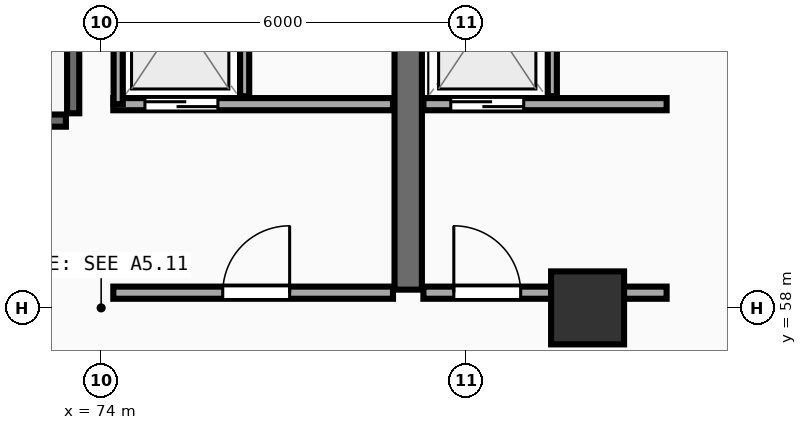
"""IFC4 building model, lengths in metres.
Left out: names, types, materials, properties, quantities, classifications, styles, units other than length and angle.
Written with IfcOpenShell. Run it as: python <this file> out.ifc"""

import sys

from ifc_helpers import new_model, si_unit, direction, frame, frame_2d, origin, origin_2d, place, context, subcontext, project, spatial, rectangle, extrude, element, fill, save


model = new_model("IFC4")
c1 = context("Model", 3, precision=1e-05, world=origin(), true_north=direction((0.0, 1.0)))
c2 = subcontext(c1, "Body", "Model", "MODEL_VIEW")
j1 = project(units=[si_unit("LENGTHUNIT", "METRE"), si_unit("PLANEANGLEUNIT", "RADIAN")], contexts=[c1])
p1 = place(None, origin())
s1 = spatial("IfcSite", under=j1, at=p1, CompositionType="ELEMENT")
p2 = place(p1, origin())
s2 = spatial("IfcBuilding", under=s1, at=p2, CompositionType="ELEMENT")
p3 = place(p2, frame((0.0, 0.0, 129.86)))
s3 = spatial("IfcBuildingStorey", under=s2, at=p3, CompositionType="ELEMENT", Elevation=129.86)
p4 = place(p3, frame((82.0, 58.0, 0.0), z_axis=(0.0, 0.0, 1.0), x_axis=(1.0, 0.0, 0.0)))
e1 = element("IfcColumn", 1, at=p4, inside=s3, PredefinedType="PILASTER", context=c2, shape_type="SweptSolid", body=[
    extrude(rectangle(XDim=1.2, YDim=1.2, at=origin_2d()), origin(), (0.0, 0.0, 1.0), 5.74),
])
p5 = place(p3, frame((66.26, 61.08, 0.0), z_axis=(0.0, 0.0, 1.0), x_axis=(1.0, 0.0, 0.0)))
e2 = element("IfcWall", 2, at=p5, inside=s3, PredefinedType="SHEAR", context=c2, shape_type="SweptSolid", body=[
    extrude(rectangle(XDim=7.16, YDim=0.2, at=frame_2d((3.58, 0.0))), origin(), (0.0, 0.0, 1.0), 5.48),
])
p6 = place(p3, frame((73.54, 61.2, 0.0), z_axis=(0.0, 0.0, 1.0), x_axis=(0.0, 1.0, 0.0)))
e3 = element("IfcWall", 3, at=p6, inside=s3, PredefinedType="SHEAR", context=c2, shape_type="SweptSolid", body=[
    extrude(rectangle(XDim=3.07, YDim=0.2, at=frame_2d((1.535, 0.0))), origin(), (0.0, 0.0, 1.0), 5.48),
])
p7 = place(p3, frame((79.05, 58.3, 0.0), z_axis=(0.0, 0.0, 1.0), x_axis=(0.0, 1.0, 0.0)))
e4 = element("IfcWall", 4, at=p7, inside=s3, PredefinedType="SHEAR", context=c2, shape_type="SweptSolid", body=[
    extrude(rectangle(XDim=6.3, YDim=0.45, at=frame_2d((3.15, 0.0))), origin(), (0.0, 0.0, 1.0), 5.48),
])
p8 = place(p3, frame((74.2, 61.35, 0.0), z_axis=(0.0, 0.0, 1.0), x_axis=(1.0, 0.0, 0.0)))
e5 = element("IfcWall", 5, at=p8, inside=s3, PredefinedType="SOLIDWALL", context=c2, shape_type="SweptSolid", body=[
    extrude(rectangle(XDim=4.6, YDim=0.2, at=frame_2d((2.3, 0.0))), origin(), (0.0, 0.0, 1.0), 5.47),
])
p9 = place(p8, frame((0.52, 0.0, 0.0)))
e6 = element("IfcOpeningElement", 6, at=p9, cuts=e5, PredefinedType="OPENING", context=c2, shape_type="SweptSolid", body=[
    extrude(rectangle(XDim=1.2, YDim=2.15, at=frame_2d((0.6, 1.075))), frame((0.0, 0.11, 0.0), z_axis=(0.0, -1.0, 0.0), x_axis=(1.0, 0.0, 0.0)), (0.0, 0.0, 1.0), 0.22),
])
p10 = place(p3, frame((74.28, 61.35, 0.0), z_axis=(0.0, 0.0, 1.0), x_axis=(0.0, 1.0, 0.0)))
e7 = element("IfcWall", 7, at=p10, inside=s3, PredefinedType="PARTITIONING", context=c2, shape_type="SweptSolid", body=[
    extrude(rectangle(XDim=2.97, YDim=0.15, at=frame_2d((1.485, 0.0))), origin(), (0.0, 0.0, 1.0), 5.47),
])
p11 = place(p3, frame((76.36, 61.48, 0.0), z_axis=(0.0, 0.0, 1.0), x_axis=(0.0, 1.0, 0.0)))
e8 = element("IfcWall", 8, at=p11, inside=s3, PredefinedType="PARTITIONING", context=c2, shape_type="SweptSolid", body=[
    extrude(rectangle(XDim=2.84, YDim=0.15, at=frame_2d((1.42, 0.0))), origin(), (0.0, 0.0, 1.0), 5.47),
])
p12 = place(p3, frame((79.3, 61.35, 0.0), z_axis=(0.0, 0.0, 1.0), x_axis=(1.0, 0.0, 0.0)))
e9 = element("IfcWall", 9, at=p12, inside=s3, PredefinedType="SOLIDWALL", context=c2, shape_type="SweptSolid", body=[
    extrude(rectangle(XDim=4.0, YDim=0.2, at=frame_2d((2.0, 0.0))), origin(), (0.0, 0.0, 1.0), 4.765),
])
p13 = place(p12, frame((0.45, 0.0, 0.0)))
e10 = element("IfcOpeningElement", 10, at=p13, cuts=e9, PredefinedType="OPENING", context=c2, shape_type="SweptSolid", body=[
    extrude(rectangle(XDim=1.2, YDim=2.15, at=frame_2d((0.6, 1.075))), frame((0.0, 0.11, 0.0), z_axis=(0.0, -1.0, 0.0), x_axis=(1.0, 0.0, 0.0)), (0.0, 0.0, 1.0), 0.22),
])
p14 = place(p3, frame((81.42, 61.48, 0.0), z_axis=(0.0, 0.0, 1.0), x_axis=(0.0, 1.0, 0.0)))
e11 = element("IfcWall", 11, at=p14, inside=s3, PredefinedType="PARTITIONING", context=c2, shape_type="SweptSolid", body=[
    extrude(rectangle(XDim=2.84, YDim=0.15, at=frame_2d((1.42, 0.0))), origin(), (0.0, 0.0, 1.0), 5.47),
])
p15 = place(p3, frame((74.2, 58.25, 0.0), z_axis=(0.0, 0.0, 1.0), x_axis=(1.0, 0.0, 0.0)))
e12 = element("IfcWall", 12, at=p15, inside=s3, PredefinedType="SOLIDWALL", context=c2, shape_type="SweptSolid", body=[
    extrude(rectangle(XDim=4.6, YDim=0.2, at=frame_2d((2.3, 0.0))), origin(), (0.0, 0.0, 1.0), 5.47),
])
p16 = place(p15, frame((1.8, 0.0, 0.0)))
e13 = element("IfcOpeningElement", 13, at=p16, cuts=e12, PredefinedType="OPENING", context=c2, shape_type="SweptSolid", body=[
    extrude(rectangle(XDim=1.1, YDim=2.1, at=frame_2d((0.55, 1.05))), frame((0.0, 0.11, 0.0), z_axis=(0.0, -1.0, 0.0), x_axis=(1.0, 0.0, 0.0)), (0.0, 0.0, 1.0), 0.22),
])
p17 = place(p3, frame((79.3, 58.25, 0.0), z_axis=(0.0, 0.0, 1.0), x_axis=(1.0, 0.0, 0.0)))
e14 = element("IfcWall", 14, at=p17, inside=s3, PredefinedType="SOLIDWALL", context=c2, shape_type="SweptSolid", body=[
    extrude(rectangle(XDim=4.0, YDim=0.2, at=frame_2d((2.0, 0.0))), origin(), (0.0, 0.0, 1.0), 4.765),
])
p18 = place(p17, frame((0.5, 0.0, 0.0)))
e15 = element("IfcOpeningElement", 15, at=p18, cuts=e14, PredefinedType="OPENING", context=c2, shape_type="SweptSolid", body=[
    extrude(rectangle(XDim=1.1, YDim=2.1, at=frame_2d((0.55, 1.05))), frame((0.0, 0.11, 0.0), z_axis=(0.0, -1.0, 0.0), x_axis=(1.0, 0.0, 0.0)), (0.0, 0.0, 1.0), 0.22),
])
p19 = place(p9, origin())
e16 = element("IfcDoor", 16, at=p19, inside=s3, OperationType="DOUBLE_DOOR_SLIDING", PredefinedType="DOOR", context=c2, shape_type="SweptSolid", body=[
    extrude(rectangle(XDim=1.2, YDim=2.15, at=frame_2d((0.6, 1.075))), frame((0.0, 0.025, 0.0), z_axis=(0.0, -1.0, 0.0), x_axis=(1.0, 0.0, 0.0)), (0.0, 0.0, 1.0), 0.05),
])
fill(e6, e16)
p20 = place(p13, origin())
e17 = element("IfcDoor", 17, at=p20, inside=s3, OperationType="DOUBLE_DOOR_SLIDING", PredefinedType="DOOR", context=c2, shape_type="SweptSolid", body=[
    extrude(rectangle(XDim=1.2, YDim=2.15, at=frame_2d((0.6, 1.075))), frame((0.0, 0.025, 0.0), z_axis=(0.0, -1.0, 0.0), x_axis=(1.0, 0.0, 0.0)), (0.0, 0.0, 1.0), 0.05),
])
fill(e10, e17)
p21 = place(p16, frame((1.1, 0.0, 0.0), z_axis=(0.0, 0.0, 1.0), x_axis=(-1.0, 0.0, 0.0)))
e18 = element("IfcDoor", 18, at=p21, inside=s3, OperationType="SINGLE_SWING_LEFT", PredefinedType="DOOR", context=c2, shape_type="SweptSolid", body=[
    extrude(rectangle(XDim=1.1, YDim=2.1, at=frame_2d((0.55, 1.05))), frame((0.0, 0.025, 0.0), z_axis=(0.0, -1.0, 0.0), x_axis=(1.0, 0.0, 0.0)), (0.0, 0.0, 1.0), 0.05),
])
fill(e13, e18)
p22 = place(p18, frame((1.1, 0.0, 0.0), z_axis=(0.0, 0.0, 1.0), x_axis=(-1.0, 0.0, 0.0)))
e19 = element("IfcDoor", 19, at=p22, inside=s3, OperationType="SINGLE_SWING_RIGHT", PredefinedType="DOOR", context=c2, shape_type="SweptSolid", body=[
    extrude(rectangle(XDim=1.1, YDim=2.1, at=frame_2d((0.55, 1.05))), frame((0.0, 0.025, 0.0), z_axis=(0.0, -1.0, 0.0), x_axis=(1.0, 0.0, 0.0)), (0.0, 0.0, 1.0), 0.05),
])
fill(e15, e19)
save(model, sys.argv[1])
